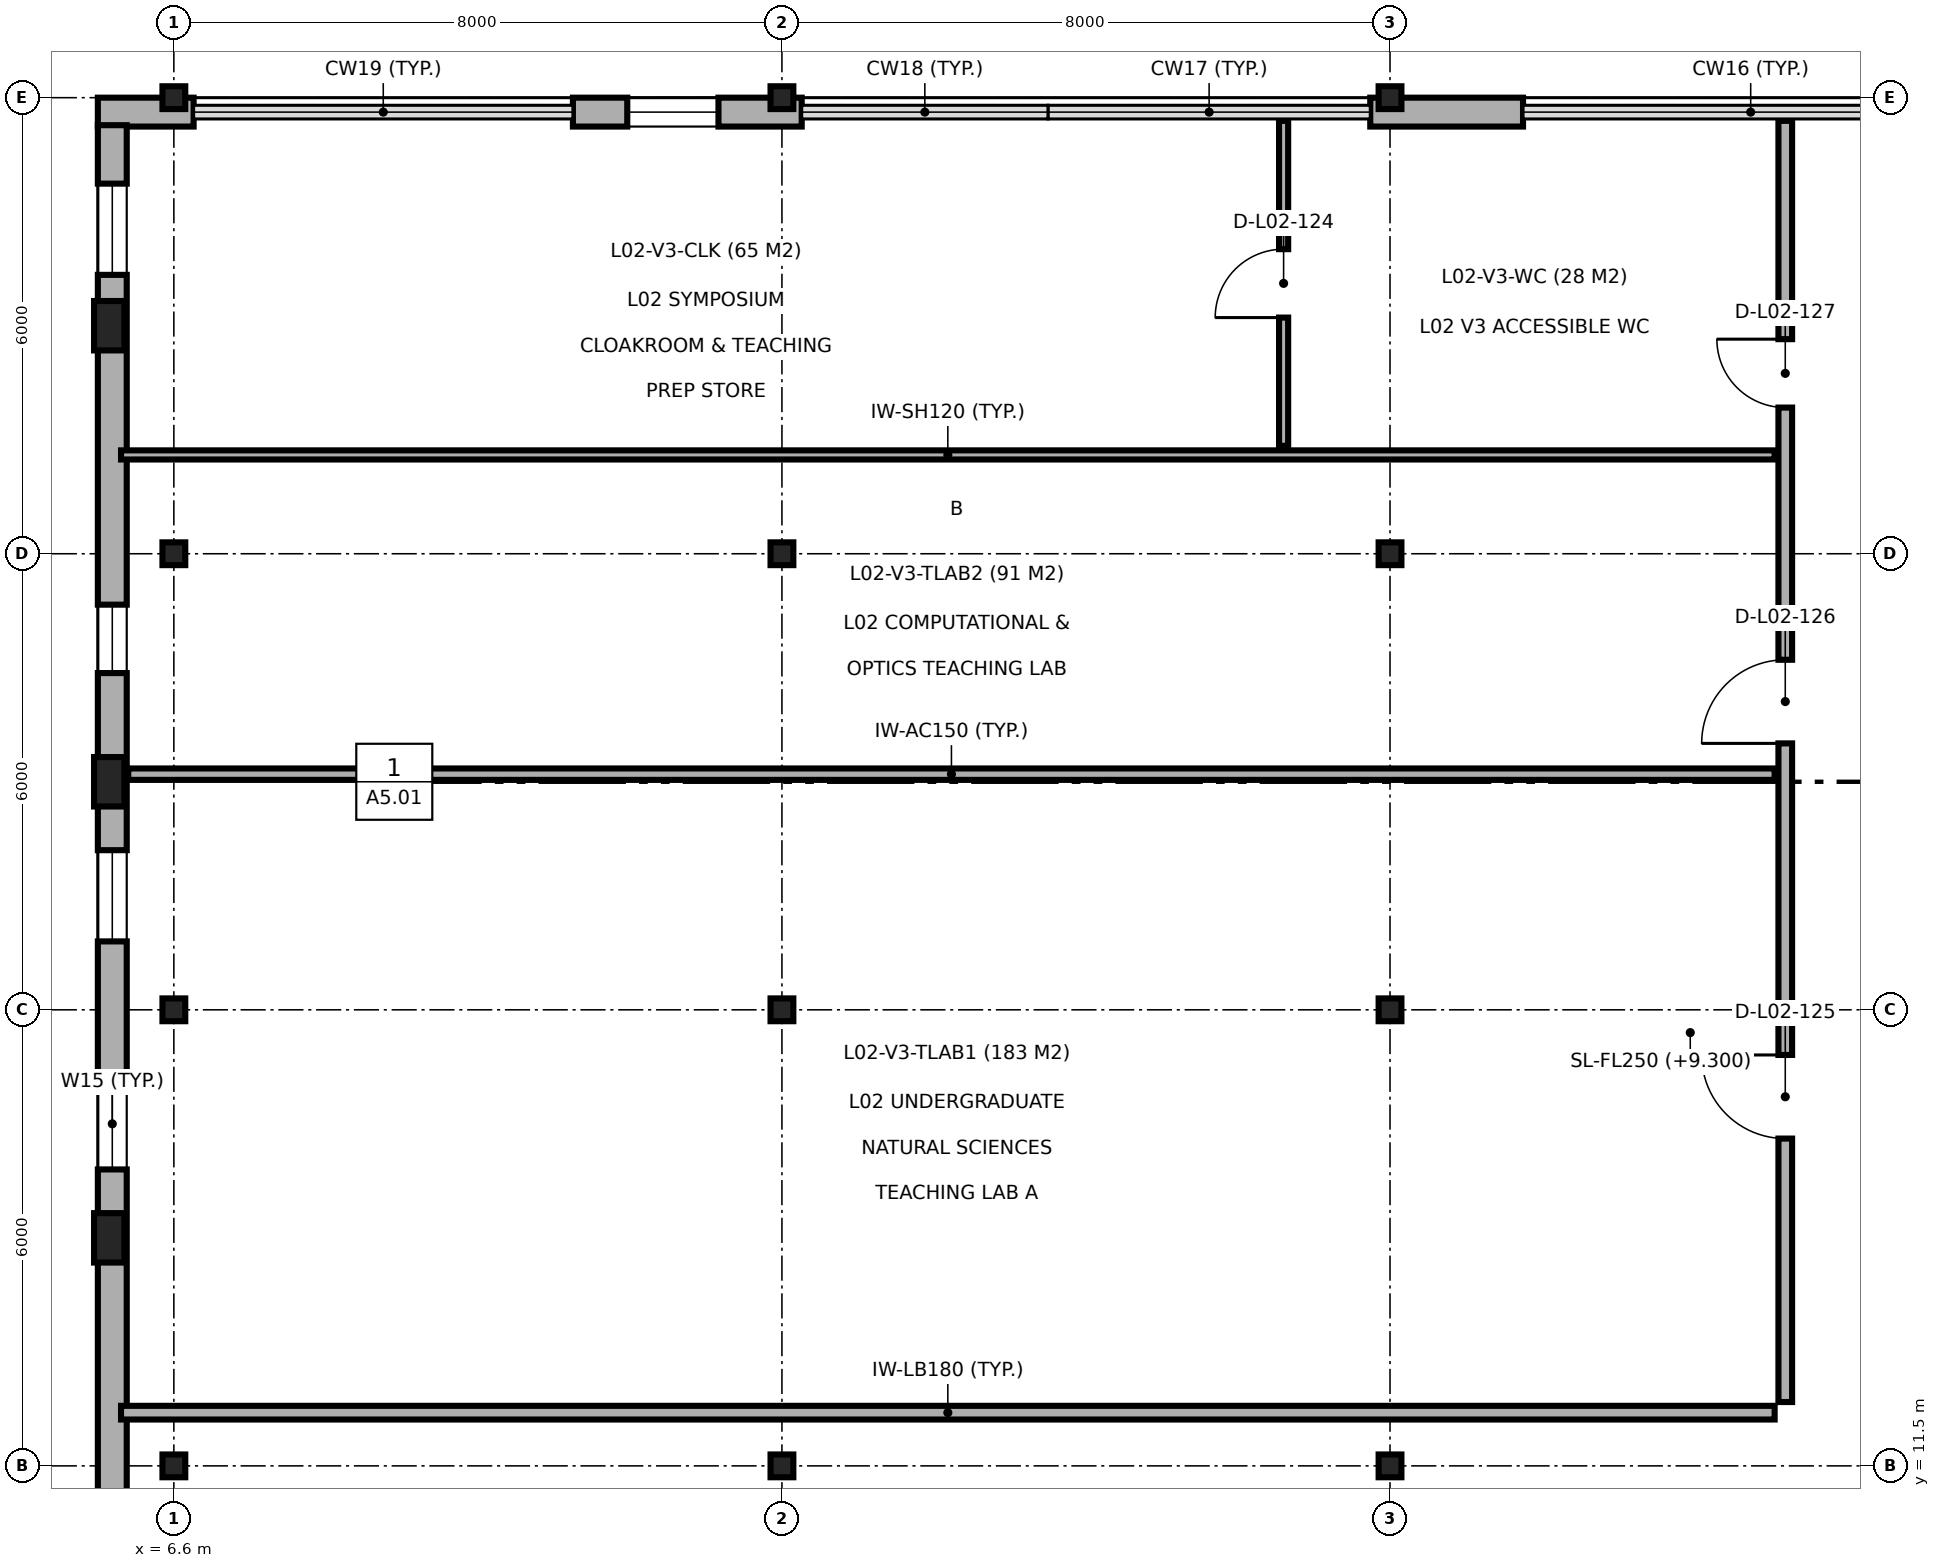
"""IFC4 building model, lengths in metres.
Left out: names, types, materials, properties, quantities, classifications, styles, units other than length and angle.
Written with IfcOpenShell. Run it as: python <this file> out.ifc"""

import sys

from ifc_helpers import new_model, si_unit, direction, frame, frame_2d, origin, origin_2d, place, context, subcontext, project, spatial, rectangle, i_section, extrude, element, fill, save


model = new_model("IFC4")
c1 = context("Model", 3, precision=1e-05, world=origin(), true_north=direction((0.0, 1.0)))
c2 = subcontext(c1, "Body", "Model", "MODEL_VIEW")
j1 = project(units=[si_unit("LENGTHUNIT", "METRE"), si_unit("PLANEANGLEUNIT", "RADIAN")], contexts=[c1])
p1 = place(None, origin())
s1 = spatial("IfcSite", under=j1, at=p1, CompositionType="ELEMENT")
p2 = place(p1, origin())
s2 = spatial("IfcBuilding", under=s1, at=p2, CompositionType="ELEMENT")
p3 = place(p2, frame((0.0, 0.0, 9.3)))
s3 = spatial("IfcBuildingStorey", under=s2, at=p3, CompositionType="ELEMENT", Elevation=9.3)
for number, where, z_axis, x_axis in (
    (1, (5.75, 14.5, 0.0), (0.0, 0.0, 1.0), (1.0, 0.0, 0.0)),
    (2, (5.75, 20.5, 0.0), (0.0, 0.0, 1.0), (1.0, 0.0, 0.0)),
    (3, (5.75, 26.5, 0.0), (0.0, 0.0, 1.0), (1.0, 0.0, 0.0)),
):
    element("IfcColumn", number, at=place(p3, frame(where, z_axis=z_axis, x_axis=x_axis)), inside=s3, PredefinedType="PILASTER", context=c2, shape_type="SweptSolid", body=[
        extrude(rectangle(XDim=0.4, YDim=0.65, at=origin_2d()), origin(), (0.0, 0.0, 1.0), 4.5),
    ])
for number, where, z_axis, x_axis in (
    (4, (6.6, 11.5, 0.0), (0.0, 0.0, 1.0), (1.0, 0.0, 0.0)),
    (5, (6.6, 17.5, 0.0), (0.0, 0.0, 1.0), (1.0, 0.0, 0.0)),
    (6, (6.6, 23.5, 0.0), (0.0, 0.0, 1.0), (1.0, 0.0, 0.0)),
    (7, (6.6, 29.5, 0.0), (0.0, 0.0, 1.0), (1.0, 0.0, 0.0)),
    (8, (14.6, 11.5, 0.0), (0.0, 0.0, 1.0), (1.0, 0.0, 0.0)),
    (9, (14.6, 17.5, 0.0), (0.0, 0.0, 1.0), (1.0, 0.0, 0.0)),
    (10, (14.6, 23.5, 0.0), (0.0, 0.0, 1.0), (1.0, 0.0, 0.0)),
    (11, (14.6, 29.5, 0.0), (0.0, 0.0, 1.0), (1.0, 0.0, 0.0)),
    (12, (22.6, 11.5, 0.0), (0.0, 0.0, 1.0), (1.0, 0.0, 0.0)),
    (13, (22.6, 17.5, 0.0), (0.0, 0.0, 1.0), (1.0, 0.0, 0.0)),
    (14, (22.6, 23.5, 0.0), (0.0, 0.0, 1.0), (1.0, 0.0, 0.0)),
    (15, (22.6, 29.5, 0.0), (0.0, 0.0, 1.0), (1.0, 0.0, 0.0)),
):
    element("IfcColumn", number, at=place(p3, frame(where, z_axis=z_axis, x_axis=x_axis)), inside=s3, PredefinedType="COLUMN", context=c2, shape_type="SweptSolid", body=[
        extrude(i_section(OverallWidth=0.3, OverallDepth=0.3, WebThickness=0.011, FlangeThickness=0.019, FilletRadius=0.027, at=origin_2d()), origin(), (0.0, 0.0, 1.0), 4.5),
    ])
p4 = place(p3, frame((24.35, 29.31, 0.0), z_axis=(0.0, 0.0, 1.0), x_axis=(-1.0, 0.0, 0.0)))
e16 = element("IfcWall", 16, at=p4, inside=s3, PredefinedType="SOLIDWALL", context=c2, shape_type="SweptSolid", body=[
    extrude(rectangle(XDim=2.01, YDim=0.38, at=frame_2d((1.005, 0.0))), origin(), (0.0, 0.0, 1.0), 4.25),
])
p5 = place(p3, frame((14.86, 29.31, 0.0), z_axis=(0.0, 0.0, 1.0), x_axis=(-1.0, 0.0, 0.0)))
e17 = element("IfcWall", 17, at=p5, inside=s3, PredefinedType="SOLIDWALL", context=c2, shape_type="SweptSolid", body=[
    extrude(rectangle(XDim=3.01, YDim=0.38, at=frame_2d((1.505, 0.0))), origin(), (0.0, 0.0, 1.0), 4.25),
])
p6 = place(p5, frame((1.095, 0.0, 0.9)))
e18 = element("IfcOpeningElement", 18, at=p6, cuts=e17, PredefinedType="OPENING", context=c2, shape_type="SweptSolid", body=[
    extrude(rectangle(XDim=1.2, YDim=1.8, at=frame_2d((0.6, 0.9))), frame((0.0, 0.2, 0.0), z_axis=(0.0, -1.0, 0.0), x_axis=(1.0, 0.0, 0.0)), (0.0, 0.0, 1.0), 0.4),
])
p7 = place(p3, frame((6.86, 29.31, 0.0), z_axis=(0.0, 0.0, 1.0), x_axis=(-1.0, 0.0, 0.0)))
e19 = element("IfcWall", 19, at=p7, inside=s3, PredefinedType="SOLIDWALL", context=c2, shape_type="SweptSolid", body=[
    extrude(rectangle(XDim=1.26, YDim=0.38, at=frame_2d((0.63, 0.0))), origin(), (0.0, 0.0, 1.0), 4.25),
])
p8 = place(p3, frame((5.79, 29.138, 0.0), z_axis=(0.0, 0.0, 1.0), x_axis=(0.0, -1.0, 0.0)))
e20 = element("IfcWall", 20, at=p8, inside=s3, PredefinedType="SOLIDWALL", context=c2, shape_type="SweptSolid", body=[
    extrude(rectangle(XDim=24.238, YDim=0.38, at=frame_2d((12.119, 0.0))), origin(), (0.0, 0.0, 1.0), 4.25),
])
p9 = place(p8, frame((0.769, 0.0, 0.9)))
e21 = element("IfcOpeningElement", 21, at=p9, cuts=e20, PredefinedType="OPENING", context=c2, shape_type="SweptSolid", body=[
    extrude(rectangle(XDim=1.2, YDim=1.8, at=frame_2d((0.6, 0.9))), frame((0.0, 0.2, 0.0), z_axis=(0.0, -1.0, 0.0), x_axis=(1.0, 0.0, 0.0)), (0.0, 0.0, 1.0), 0.4),
])
p10 = place(p8, frame((6.308, 0.0, 0.9)))
e22 = element("IfcOpeningElement", 22, at=p10, cuts=e20, PredefinedType="OPENING", context=c2, shape_type="SweptSolid", body=[
    extrude(rectangle(XDim=0.9, YDim=1.8, at=frame_2d((0.45, 0.9))), frame((0.0, 0.2, 0.0), z_axis=(0.0, -1.0, 0.0), x_axis=(1.0, 0.0, 0.0)), (0.0, 0.0, 1.0), 0.4),
])
p11 = place(p8, frame((9.538, 0.0, 0.9)))
e23 = element("IfcOpeningElement", 23, at=p11, cuts=e20, PredefinedType="OPENING", context=c2, shape_type="SweptSolid", body=[
    extrude(rectangle(XDim=1.2, YDim=1.8, at=frame_2d((0.6, 0.9))), frame((0.0, 0.2, 0.0), z_axis=(0.0, -1.0, 0.0), x_axis=(1.0, 0.0, 0.0)), (0.0, 0.0, 1.0), 0.4),
])
p12 = place(p8, frame((12.538, 0.0, 0.9)))
e24 = element("IfcOpeningElement", 24, at=p12, cuts=e20, PredefinedType="OPENING", context=c2, shape_type="SweptSolid", body=[
    extrude(rectangle(XDim=1.2, YDim=1.5, at=frame_2d((0.6, 0.75))), frame((0.0, 0.2, 0.0), z_axis=(0.0, -1.0, 0.0), x_axis=(1.0, 0.0, 0.0)), (0.0, 0.0, 1.0), 0.4),
])
p13 = place(p8, frame((18.538, 0.0, 0.9)))
e25 = element("IfcOpeningElement", 25, at=p13, cuts=e20, PredefinedType="OPENING", context=c2, shape_type="SweptSolid", body=[
    extrude(rectangle(XDim=1.2, YDim=1.8, at=frame_2d((0.6, 0.9))), frame((0.0, 0.2, 0.0), z_axis=(0.0, -1.0, 0.0), x_axis=(1.0, 0.0, 0.0)), (0.0, 0.0, 1.0), 0.4),
])
p14 = place(p8, frame((21.528, 0.0, 0.9)))
e26 = element("IfcOpeningElement", 26, at=p14, cuts=e20, PredefinedType="OPENING", context=c2, shape_type="SweptSolid", body=[
    extrude(rectangle(XDim=1.2, YDim=2.4, at=frame_2d((0.6, 1.2))), frame((0.0, 0.2, 0.0), z_axis=(0.0, -1.0, 0.0), x_axis=(1.0, 0.0, 0.0)), (0.0, 0.0, 1.0), 0.4),
])
p15 = place(p3, frame((5.905, 12.2, 0.0), z_axis=(0.0, 0.0, 1.0), x_axis=(1.0, 0.0, 0.0)))
e27 = element("IfcWall", 27, at=p15, inside=s3, PredefinedType="PARTITIONING", context=c2, shape_type="SweptSolid", body=[
    extrude(rectangle(XDim=21.755, YDim=0.18, at=frame_2d((10.877, 0.0))), origin(), (0.0, 0.0, 1.0), 4.25),
])
p16 = place(p3, frame((6.0, 20.6, 0.0), z_axis=(0.0, 0.0, 1.0), x_axis=(1.0, 0.0, 0.0)))
e28 = element("IfcWall", 28, at=p16, inside=s3, PredefinedType="PARTITIONING", context=c2, shape_type="SweptSolid", body=[
    extrude(rectangle(XDim=21.66, YDim=0.15, at=frame_2d((10.83, 0.0))), origin(), (0.0, 0.0, 1.0), 4.25),
])
p17 = place(p3, frame((5.905, 24.8, 0.0), z_axis=(0.0, 0.0, 1.0), x_axis=(1.0, 0.0, 0.0)))
e29 = element("IfcWall", 29, at=p17, inside=s3, PredefinedType="PARTITIONING", context=c2, shape_type="SweptSolid", body=[
    extrude(rectangle(XDim=21.755, YDim=0.12, at=frame_2d((10.877, 0.0))), origin(), (0.0, 0.0, 1.0), 4.25),
])
p18 = place(p3, frame((21.2, 24.92, 0.0), z_axis=(0.0, 0.0, 1.0), x_axis=(0.0, 1.0, 0.0)))
e30 = element("IfcWall", 30, at=p18, inside=s3, PredefinedType="PARTITIONING", context=c2, shape_type="SweptSolid", body=[
    extrude(rectangle(XDim=4.275, YDim=0.12, at=frame_2d((2.138, 0.0))), origin(), (0.0, 0.0, 1.0), 4.25),
])
p19 = place(p18, frame((1.687, 0.0, 0.0)))
e31 = element("IfcOpeningElement", 31, at=p19, cuts=e30, PredefinedType="OPENING", context=c2, shape_type="SweptSolid", body=[
    extrude(rectangle(XDim=0.9, YDim=2.1, at=frame_2d((0.45, 1.05))), frame((0.0, 0.07, 0.0), z_axis=(0.0, -1.0, 0.0), x_axis=(1.0, 0.0, 0.0)), (0.0, 0.0, 1.0), 0.14),
])
p20 = place(p3, frame((27.8, 12.34, 0.0), z_axis=(0.0, 0.0, 1.0), x_axis=(0.0, 1.0, 0.0)))
e32 = element("IfcWall", 32, at=p20, inside=s3, PredefinedType="PARTITIONING", context=c2, shape_type="SweptSolid", body=[
    extrude(rectangle(XDim=16.855, YDim=0.18, at=frame_2d((8.427, 0.0))), origin(), (0.0, 0.0, 1.0), 4.02),
])
p21 = place(p20, frame((3.466, 0.0, 0.0)))
e33 = element("IfcOpeningElement", 33, at=p21, cuts=e32, PredefinedType="OPENING", context=c2, shape_type="SweptSolid", body=[
    extrude(rectangle(XDim=1.1, YDim=2.15, at=frame_2d((0.55, 1.075))), frame((0.0, 0.1, 0.0), z_axis=(0.0, -1.0, 0.0), x_axis=(1.0, 0.0, 0.0)), (0.0, 0.0, 1.0), 0.2),
])
p22 = place(p20, frame((8.665, 0.0, 0.0)))
e34 = element("IfcOpeningElement", 34, at=p22, cuts=e32, PredefinedType="OPENING", context=c2, shape_type="SweptSolid", body=[
    extrude(rectangle(XDim=1.1, YDim=2.15, at=frame_2d((0.55, 1.075))), frame((0.0, 0.1, 0.0), z_axis=(0.0, -1.0, 0.0), x_axis=(1.0, 0.0, 0.0)), (0.0, 0.0, 1.0), 0.2),
])
p23 = place(p20, frame((13.083, 0.0, 0.0)))
e35 = element("IfcOpeningElement", 35, at=p23, cuts=e32, PredefinedType="OPENING", context=c2, shape_type="SweptSolid", body=[
    extrude(rectangle(XDim=0.9, YDim=2.1, at=frame_2d((0.45, 1.05))), frame((0.0, 0.1, 0.0), z_axis=(0.0, -1.0, 0.0), x_axis=(1.0, 0.0, 0.0)), (0.0, 0.0, 1.0), 0.2),
])
p24 = place(p6, origin())
e36 = element("IfcWindow", 36, at=p24, inside=s3, PartitioningType="SINGLE_PANEL", PredefinedType="WINDOW", context=c2, shape_type="SweptSolid", body=[
    extrude(rectangle(XDim=1.2, YDim=1.8, at=frame_2d((0.6, 0.9))), frame((0.0, 0.03, 0.0), z_axis=(0.0, -1.0, 0.0), x_axis=(1.0, 0.0, 0.0)), (0.0, 0.0, 1.0), 0.06),
])
fill(e18, e36)
p25 = place(p9, origin())
e37 = element("IfcWindow", 37, at=p25, inside=s3, PartitioningType="SINGLE_PANEL", PredefinedType="WINDOW", context=c2, shape_type="SweptSolid", body=[
    extrude(rectangle(XDim=1.2, YDim=1.8, at=frame_2d((0.6, 0.9))), frame((0.0, 0.03, 0.0), z_axis=(0.0, -1.0, 0.0), x_axis=(1.0, 0.0, 0.0)), (0.0, 0.0, 1.0), 0.06),
])
fill(e21, e37)
p26 = place(p10, origin())
e38 = element("IfcWindow", 38, at=p26, inside=s3, PartitioningType="SINGLE_PANEL", PredefinedType="WINDOW", context=c2, shape_type="SweptSolid", body=[
    extrude(rectangle(XDim=0.9, YDim=1.8, at=frame_2d((0.45, 0.9))), frame((0.0, 0.03, 0.0), z_axis=(0.0, -1.0, 0.0), x_axis=(1.0, 0.0, 0.0)), (0.0, 0.0, 1.0), 0.06),
])
fill(e22, e38)
p27 = place(p11, origin())
e39 = element("IfcWindow", 39, at=p27, inside=s3, PartitioningType="SINGLE_PANEL", PredefinedType="WINDOW", context=c2, shape_type="SweptSolid", body=[
    extrude(rectangle(XDim=1.2, YDim=1.8, at=frame_2d((0.6, 0.9))), frame((0.0, 0.03, 0.0), z_axis=(0.0, -1.0, 0.0), x_axis=(1.0, 0.0, 0.0)), (0.0, 0.0, 1.0), 0.06),
])
fill(e23, e39)
p28 = place(p12, origin())
e40 = element("IfcWindow", 40, at=p28, inside=s3, PartitioningType="SINGLE_PANEL", PredefinedType="WINDOW", context=c2, shape_type="SweptSolid", body=[
    extrude(rectangle(XDim=1.2, YDim=1.5, at=frame_2d((0.6, 0.75))), frame((0.0, 0.03, 0.0), z_axis=(0.0, -1.0, 0.0), x_axis=(1.0, 0.0, 0.0)), (0.0, 0.0, 1.0), 0.06),
])
fill(e24, e40)
p29 = place(p19, origin())
e41 = element("IfcDoor", 41, at=p29, inside=s3, OperationType="SINGLE_SWING_LEFT", PredefinedType="DOOR", context=c2, shape_type="SweptSolid", body=[
    extrude(rectangle(XDim=0.9, YDim=2.1, at=frame_2d((0.45, 1.05))), frame((0.0, 0.025, 0.0), z_axis=(0.0, -1.0, 0.0), x_axis=(1.0, 0.0, 0.0)), (0.0, 0.0, 1.0), 0.05),
])
fill(e31, e41)
p30 = place(p21, origin())
e42 = element("IfcDoor", 42, at=p30, inside=s3, OperationType="SINGLE_SWING_RIGHT", PredefinedType="DOOR", context=c2, shape_type="SweptSolid", body=[
    extrude(rectangle(XDim=1.1, YDim=2.15, at=frame_2d((0.55, 1.075))), frame((0.0, 0.025, 0.0), z_axis=(0.0, -1.0, 0.0), x_axis=(1.0, 0.0, 0.0)), (0.0, 0.0, 1.0), 0.05),
])
fill(e33, e42)
p31 = place(p22, origin())
e43 = element("IfcDoor", 43, at=p31, inside=s3, OperationType="SINGLE_SWING_LEFT", PredefinedType="DOOR", context=c2, shape_type="SweptSolid", body=[
    extrude(rectangle(XDim=1.1, YDim=2.15, at=frame_2d((0.55, 1.075))), frame((0.0, 0.025, 0.0), z_axis=(0.0, -1.0, 0.0), x_axis=(1.0, 0.0, 0.0)), (0.0, 0.0, 1.0), 0.05),
])
fill(e34, e43)
p32 = place(p23, origin())
e44 = element("IfcDoor", 44, at=p32, inside=s3, OperationType="SINGLE_SWING_RIGHT", PredefinedType="DOOR", context=c2, shape_type="SweptSolid", body=[
    extrude(rectangle(XDim=0.9, YDim=2.1, at=frame_2d((0.45, 1.05))), frame((0.0, 0.025, 0.0), z_axis=(0.0, -1.0, 0.0), x_axis=(1.0, 0.0, 0.0)), (0.0, 0.0, 1.0), 0.05),
])
fill(e35, e44)
save(model, sys.argv[1])
